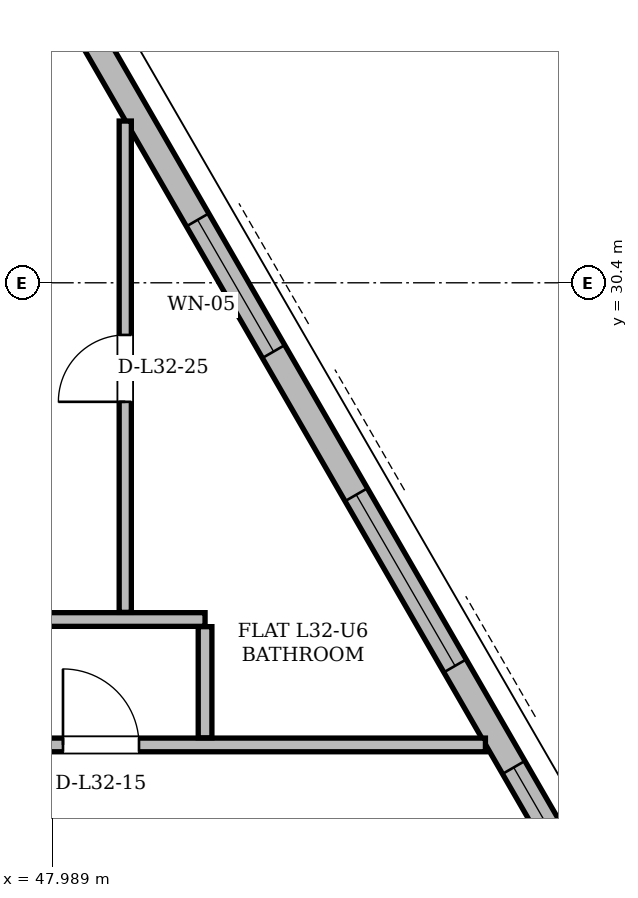
"""IFC4 building model, lengths in metres.
Left out: names, types, materials, properties, quantities, classifications, styles, units other than length and angle.
Written with IfcOpenShell. Run it as: python <this file> out.ifc"""

import sys

from ifc_helpers import new_model, si_unit, direction, frame, frame_2d, origin, place, context, subcontext, project, spatial, rectangle, extrude, element, fill, save


model = new_model("IFC4")
c1 = context("Model", 3, precision=1e-05, world=origin(), true_north=direction((0.0, 1.0)))
c2 = subcontext(c1, "Body", "Model", "MODEL_VIEW")
j1 = project(units=[si_unit("LENGTHUNIT", "METRE"), si_unit("PLANEANGLEUNIT", "RADIAN")], contexts=[c1])
p1 = place(None, origin())
s1 = spatial("IfcSite", under=j1, at=p1, CompositionType="ELEMENT")
p2 = place(p1, origin())
s2 = spatial("IfcBuilding", under=s1, at=p2, CompositionType="ELEMENT")
p3 = place(p2, frame((0.0, 0.0, 123.0)))
s3 = spatial("IfcBuildingStorey", under=s2, at=p3, CompositionType="ELEMENT", Elevation=123.0)
p4 = place(p3, frame((60.364, 13.107, 0.0), z_axis=(0.0, 0.0, 1.0), x_axis=(-0.499996370967, 0.866027498997, 0.0)))
e1 = element("IfcWall", 1, at=p4, inside=s3, PredefinedType="SOLIDWALL", context=c2, shape_type="SweptSolid", body=[
    extrude(rectangle(XDim=34.976, YDim=0.34, at=frame_2d((17.488, 0.0))), origin(), (0.0, 0.0, 1.0), 2.578),
])
p5 = place(p4, frame((8.034, 0.0, 0.0)))
e2 = element("IfcOpeningElement", 2, at=p5, cuts=e1, PredefinedType="OPENING", context=c2, shape_type="SweptSolid", body=[
    extrude(rectangle(XDim=1.5, YDim=2.2, at=frame_2d((0.75, 1.1))), frame((0.0, 0.17, 0.0), z_axis=(0.0, -1.0, 0.0), x_axis=(1.0, 0.0, 0.0)), (0.0, 0.0, 1.0), 0.34),
])
p6 = place(p4, frame((27.106, 0.0, 0.0)))
e3 = element("IfcOpeningElement", 3, at=p6, cuts=e1, PredefinedType="OPENING", context=c2, shape_type="SweptSolid", body=[
    extrude(rectangle(XDim=1.5, YDim=2.2, at=frame_2d((0.75, 1.1))), frame((0.0, 0.17, 0.0), z_axis=(0.0, -1.0, 0.0), x_axis=(1.0, 0.0, 0.0)), (0.0, 0.0, 1.0), 0.34),
])
p7 = place(p4, frame((3.285, 0.0, 0.85)))
e4 = element("IfcOpeningElement", 4, at=p7, cuts=e1, PredefinedType="OPENING", context=c2, shape_type="SweptSolid", body=[
    extrude(rectangle(XDim=1.2, YDim=1.48, at=frame_2d((0.6, 0.74))), frame((0.0, 0.17, 0.0), z_axis=(0.0, -1.0, 0.0), x_axis=(1.0, 0.0, 0.0)), (0.0, 0.0, 1.0), 0.34),
])
p8 = place(p4, frame((11.406, 0.0, 0.85)))
e5 = element("IfcOpeningElement", 5, at=p8, cuts=e1, PredefinedType="OPENING", context=c2, shape_type="SweptSolid", body=[
    extrude(rectangle(XDim=1.2, YDim=1.48, at=frame_2d((0.6, 0.74))), frame((0.0, 0.17, 0.0), z_axis=(0.0, -1.0, 0.0), x_axis=(1.0, 0.0, 0.0)), (0.0, 0.0, 1.0), 0.34),
])
p9 = place(p4, frame((31.066, 0.0, 0.85)))
e6 = element("IfcOpeningElement", 6, at=p9, cuts=e1, PredefinedType="OPENING", context=c2, shape_type="SweptSolid", body=[
    extrude(rectangle(XDim=2.2, YDim=1.618, at=frame_2d((1.1, 0.809))), frame((0.0, 0.17, 0.0), z_axis=(0.0, -1.0, 0.0), x_axis=(1.0, 0.0, 0.0)), (0.0, 0.0, 1.0), 0.34),
])
p10 = place(p4, frame((14.149, 0.0, 0.85)))
e7 = element("IfcOpeningElement", 7, at=p10, cuts=e1, PredefinedType="OPENING", context=c2, shape_type="SweptSolid", body=[
    extrude(rectangle(XDim=2.6, YDim=1.618, at=frame_2d((1.3, 0.809))), frame((0.0, 0.17, 0.0), z_axis=(0.0, -1.0, 0.0), x_axis=(1.0, 0.0, 0.0)), (0.0, 0.0, 1.0), 0.34),
])
p11 = place(p4, frame((18.924, 0.0, 0.85)))
e8 = element("IfcOpeningElement", 8, at=p11, cuts=e1, PredefinedType="OPENING", context=c2, shape_type="SweptSolid", body=[
    extrude(rectangle(XDim=2.0, YDim=1.618, at=frame_2d((1.0, 0.809))), frame((0.0, 0.17, 0.0), z_axis=(0.0, -1.0, 0.0), x_axis=(1.0, 0.0, 0.0)), (0.0, 0.0, 1.0), 0.34),
])
p12 = place(p3, frame((46.09, 24.32, 0.0), z_axis=(0.0, 0.0, 1.0), x_axis=(1.0, 0.0, 0.0)))
e9 = element("IfcWall", 9, at=p12, inside=s3, PredefinedType="PARTITIONING", context=c2, shape_type="SweptSolid", body=[
    extrude(rectangle(XDim=7.599, YDim=0.18, at=frame_2d((3.799, 0.0))), origin(), (0.0, 0.0, 1.0), 3.36),
])
p13 = place(p12, frame((2.041, 0.0, 0.0)))
e10 = element("IfcOpeningElement", 10, at=p13, cuts=e9, PredefinedType="OPENING", context=c2, shape_type="SweptSolid", body=[
    extrude(rectangle(XDim=1.0, YDim=2.18, at=frame_2d((0.5, 1.09))), frame((0.0, 0.09, 0.0), z_axis=(0.0, -1.0, 0.0), x_axis=(1.0, 0.0, 0.0)), (0.0, 0.0, 1.0), 0.18),
])
p14 = place(p3, frame((38.3, 25.97, 0.0), z_axis=(0.0, 0.0, 1.0), x_axis=(1.0, 0.0, 0.0)))
e11 = element("IfcWall", 11, at=p14, inside=s3, PredefinedType="PARTITIONING", context=c2, shape_type="SweptSolid", body=[
    extrude(rectangle(XDim=11.7, YDim=0.18, at=frame_2d((5.85, 0.0))), origin(), (0.0, 0.0, 1.0), 2.814),
])
p15 = place(p3, frame((48.95, 26.064, 0.0), z_axis=(0.0, 0.0, 1.0), x_axis=(0.0, 1.0, 0.0)))
e12 = element("IfcWall", 12, at=p15, inside=s3, PredefinedType="PARTITIONING", context=c2, shape_type="SweptSolid", body=[
    extrude(rectangle(XDim=6.464, YDim=0.16, at=frame_2d((3.232, 0.0))), origin(), (0.0, 0.0, 1.0), 2.578),
])
p16 = place(p15, frame((2.77, 0.0, 0.0)))
e13 = element("IfcOpeningElement", 13, at=p16, cuts=e12, PredefinedType="OPENING", context=c2, shape_type="SweptSolid", body=[
    extrude(rectangle(XDim=0.88, YDim=2.08, at=frame_2d((0.44, 1.04))), frame((0.0, 0.08, 0.0), z_axis=(0.0, -1.0, 0.0), x_axis=(1.0, 0.0, 0.0)), (0.0, 0.0, 1.0), 0.16),
])
p17 = place(p3, frame((50.0, 24.414, 0.0), z_axis=(0.0, 0.0, 1.0), x_axis=(0.0, 1.0, 0.0)))
e14 = element("IfcWall", 14, at=p17, inside=s3, PredefinedType="PARTITIONING", context=c2, shape_type="SweptSolid", body=[
    extrude(rectangle(XDim=1.462, YDim=0.18, at=frame_2d((0.731, 0.0))), origin(), (0.0, 0.0, 1.0), 3.36),
])
p18 = place(p8, origin())
e15 = element("IfcWindow", 15, at=p18, inside=s3, PartitioningType="SINGLE_PANEL", PredefinedType="WINDOW", context=c2, shape_type="SweptSolid", body=[
    extrude(rectangle(XDim=1.2, YDim=1.48, at=frame_2d((0.6, 0.74))), frame((0.0, 0.03, 0.0), z_axis=(0.0, -1.0, 0.0), x_axis=(1.0, 0.0, 0.0)), (0.0, 0.0, 1.0), 0.06),
])
fill(e5, e15)
p19 = place(p10, origin())
e16 = element("IfcWindow", 16, at=p19, inside=s3, PartitioningType="SINGLE_PANEL", PredefinedType="WINDOW", context=c2, shape_type="SweptSolid", body=[
    extrude(rectangle(XDim=2.6, YDim=1.618, at=frame_2d((1.3, 0.809))), frame((0.0, 0.03, 0.0), z_axis=(0.0, -1.0, 0.0), x_axis=(1.0, 0.0, 0.0)), (0.0, 0.0, 1.0), 0.06),
])
fill(e7, e16)
p20 = place(p11, origin())
e17 = element("IfcWindow", 17, at=p20, inside=s3, PartitioningType="SINGLE_PANEL", PredefinedType="WINDOW", context=c2, shape_type="SweptSolid", body=[
    extrude(rectangle(XDim=2.0, YDim=1.618, at=frame_2d((1.0, 0.809))), frame((0.0, 0.03, 0.0), z_axis=(0.0, -1.0, 0.0), x_axis=(1.0, 0.0, 0.0)), (0.0, 0.0, 1.0), 0.06),
])
fill(e8, e17)
p21 = place(p13, origin())
e18 = element("IfcDoor", 18, at=p21, inside=s3, OperationType="SINGLE_SWING_LEFT", PredefinedType="DOOR", context=c2, shape_type="SweptSolid", body=[
    extrude(rectangle(XDim=1.0, YDim=2.18, at=frame_2d((0.5, 1.09))), frame((0.0, 0.025, 0.0), z_axis=(0.0, -1.0, 0.0), x_axis=(1.0, 0.0, 0.0)), (0.0, 0.0, 1.0), 0.05),
])
fill(e10, e18)
p22 = place(p16, origin())
e19 = element("IfcDoor", 19, at=p22, inside=s3, OperationType="SINGLE_SWING_LEFT", PredefinedType="DOOR", context=c2, shape_type="SweptSolid", body=[
    extrude(rectangle(XDim=0.88, YDim=2.08, at=frame_2d((0.44, 1.04))), frame((0.0, 0.025, 0.0), z_axis=(0.0, -1.0, 0.0), x_axis=(1.0, 0.0, 0.0)), (0.0, 0.0, 1.0), 0.05),
])
fill(e13, e19)
save(model, sys.argv[1])
